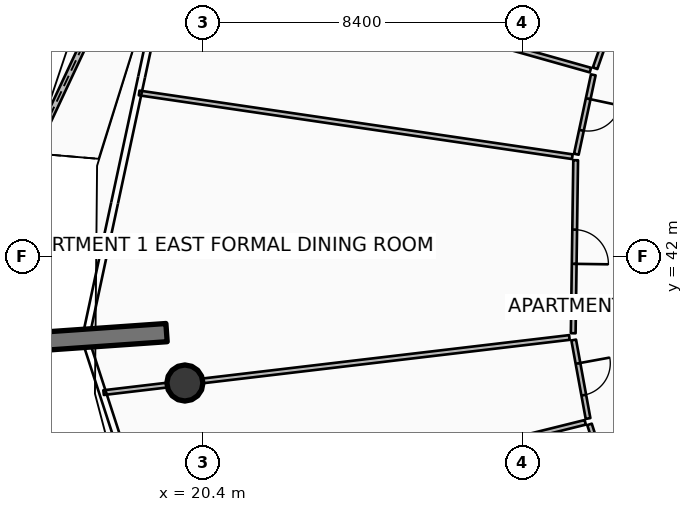
"""IFC4 building model, lengths in metres.
Left out: names, types, materials, properties, quantities, classifications, styles, units other than length and angle.
Written with IfcOpenShell. Run it as: python <this file> out.ifc"""

import sys

from ifc_helpers import new_model, si_unit, direction, frame, frame_2d, origin, origin_2d, place, context, subcontext, project, spatial, polyline, rectangle, circle, outline, extrude, element, fill, save


model = new_model("IFC4")
c1 = context("Model", 3, precision=1e-05, world=origin(), true_north=direction((0.0, 1.0)))
c2 = subcontext(c1, "Body", "Model", "MODEL_VIEW")
j1 = project(units=[si_unit("LENGTHUNIT", "METRE"), si_unit("PLANEANGLEUNIT", "RADIAN")], contexts=[c1])
p1 = place(None, origin())
s1 = spatial("IfcSite", under=j1, at=p1, CompositionType="ELEMENT")
p2 = place(p1, origin())
s2 = spatial("IfcBuilding", under=s1, at=p2, CompositionType="ELEMENT")
p3 = place(p2, frame((0.0, 0.0, 248.25)))
s3 = spatial("IfcBuildingStorey", under=s2, at=p3, CompositionType="ELEMENT", Elevation=248.25)
p4 = place(p3, frame((19.438, 40.003, 0.0), z_axis=(0.0, 0.0, 1.0), x_axis=(-0.997563824095, -0.069759707979, 0.0)))
e1 = element("IfcWall", 1, at=p4, inside=s3, PredefinedType="SOLIDWALL", context=c2, shape_type="SweptSolid", body=[
    extrude(rectangle(XDim=3.5, YDim=0.48, at=frame_2d((1.75, 0.0))), origin(), (0.0, 0.0, 1.0), 3.85),
])
p5 = place(p3, frame((19.92, 38.677, 0.0), z_axis=(0.0, 0.0, 1.0), x_axis=(1.0, 0.0, 0.0)))
e2 = element("IfcColumn", 2, at=p5, inside=s3, PredefinedType="COLUMN", context=c2, shape_type="SweptSolid", body=[
    extrude(circle(Radius=0.475, at=origin_2d()), origin(), (0.0, 0.0, 1.0), 3.59),
])
p6 = place(p3, frame((21.012, 55.616, 0.0), z_axis=(0.0, 0.0, 1.0), x_axis=(-0.424181665689, -0.905577116812, 0.0)))
e3 = element("IfcWall", 3, at=p6, inside=s3, PredefinedType="PARAPET", context=c2, shape_type="SweptSolid", body=[
    extrude(outline(polyline([(0.0, 0.0), (12.029, 0.0), (12.029, 1.224), (6.015, 1.127), (0.0, 1.148), (0.0, 0.0)])), frame((0.0, 0.09, 0.0), z_axis=(0.0, -1.0, 0.0), x_axis=(1.0, 0.0, 0.0)), (0.0, 0.0, 1.0), 0.18),
])
p7 = place(p3, frame((31.41, 48.938, 0.0), z_axis=(0.0, 0.0, 1.0), x_axis=(-0.331438416753, -0.943476854989, 0.0)))
e4 = element("IfcWall", 4, at=p7, inside=s3, PredefinedType="PARTITIONING", context=c2, shape_type="SweptSolid", body=[
    extrude(rectangle(XDim=2.099, YDim=0.125, at=frame_2d((1.049, 0.0))), origin(), (0.0, 0.0, 1.0), 2.957),
])
p8 = place(p7, frame((0.625, 0.0, 0.0)))
e5 = element("IfcOpeningElement", 5, at=p8, cuts=e4, PredefinedType="OPENING", context=c2, shape_type="SweptSolid", body=[
    extrude(rectangle(XDim=0.85, YDim=2.06, at=frame_2d((0.425, 1.03))), frame((0.0, 0.073, 0.0), z_axis=(0.0, -1.0, 0.0), x_axis=(1.0, 0.0, 0.0)), (0.0, 0.0, 1.0), 0.145),
])
p9 = place(p3, frame((30.592, 46.909, 0.0), z_axis=(0.0, 0.0, 1.0), x_axis=(-0.96245110957, 0.271455082266, 0.0)))
e6 = element("IfcWall", 6, at=p9, inside=s3, PredefinedType="PARTITIONING", context=c2, shape_type="SweptSolid", body=[
    extrude(rectangle(XDim=11.409, YDim=0.125, at=frame_2d((5.704, 0.0))), origin(), (0.0, 0.0, 1.0), 2.957),
])
p10 = place(p3, frame((30.115, 44.631, 0.0), z_axis=(0.0, 0.0, 1.0), x_axis=(-0.989347020715, 0.145576346298, 0.0)))
e7 = element("IfcWall", 7, at=p10, inside=s3, PredefinedType="PARTITIONING", context=c2, shape_type="SweptSolid", body=[
    extrude(rectangle(XDim=11.521, YDim=0.125, at=frame_2d((5.761, 0.0))), origin(), (0.0, 0.0, 1.0), 3.03),
])
p11 = place(p3, frame((30.667, 46.785, 0.0), z_axis=(0.0, 0.0, 1.0), x_axis=(-0.209005902588, -0.977914379014, 0.0)))
e8 = element("IfcWall", 8, at=p11, inside=s3, PredefinedType="PARTITIONING", context=c2, shape_type="SweptSolid", body=[
    extrude(rectangle(XDim=2.135, YDim=0.125, at=frame_2d((1.068, 0.0))), origin(), (0.0, 0.0, 1.0), 2.957),
])
p12 = place(p11, frame((0.643, 0.0, 0.0)))
e9 = element("IfcOpeningElement", 9, at=p12, cuts=e8, PredefinedType="OPENING", context=c2, shape_type="SweptSolid", body=[
    extrude(rectangle(XDim=0.85, YDim=2.06, at=frame_2d((0.425, 1.03))), frame((0.0, 0.073, 0.0), z_axis=(0.0, -1.0, 0.0), x_axis=(1.0, 0.0, 0.0)), (0.0, 0.0, 1.0), 0.145),
])
p13 = place(p3, frame((30.204, 44.538, 0.0), z_axis=(0.0, 0.0, 1.0), x_axis=(-0.014156354672, -0.999899793791, 0.0)))
e10 = element("IfcWall", 10, at=p13, inside=s3, PredefinedType="PARTITIONING", context=c2, shape_type="SweptSolid", body=[
    extrude(rectangle(XDim=4.553, YDim=0.125, at=frame_2d((2.276, 0.0))), origin(), (0.0, 0.0, 1.0), 2.957),
])
p14 = place(p13, frame((1.826, 0.0, 0.0)))
e11 = element("IfcOpeningElement", 11, at=p14, cuts=e10, PredefinedType="OPENING", context=c2, shape_type="SweptSolid", body=[
    extrude(rectangle(XDim=0.9, YDim=2.08, at=frame_2d((0.45, 1.04))), frame((0.0, 0.073, 0.0), z_axis=(0.0, -1.0, 0.0), x_axis=(1.0, 0.0, 0.0)), (0.0, 0.0, 1.0), 0.145),
])
p15 = place(p3, frame((30.038, 39.874, 0.0), z_axis=(0.0, 0.0, 1.0), x_axis=(-0.993068810962, -0.117534406428, 0.0)))
e12 = element("IfcWall", 12, at=p15, inside=s3, PredefinedType="PARTITIONING", context=c2, shape_type="SweptSolid", body=[
    extrude(rectangle(XDim=12.343, YDim=0.125, at=frame_2d((6.171, 0.0))), origin(), (0.0, 0.0, 1.0), 2.957),
])
p16 = place(p3, frame((30.456, 37.642, 0.0), z_axis=(0.0, 0.0, 1.0), x_axis=(-0.970505215381, -0.241080125513, 0.0)))
e13 = element("IfcWall", 13, at=p16, inside=s3, PredefinedType="PARTITIONING", context=c2, shape_type="SweptSolid", body=[
    extrude(rectangle(XDim=11.843, YDim=0.125, at=frame_2d((5.921, 0.0))), origin(), (0.0, 0.0, 1.0), 3.03),
])
p17 = place(p3, frame((30.152, 39.807, 0.0), z_axis=(0.0, 0.0, 1.0), x_axis=(0.179601937348, -0.983739367973, 0.0)))
e14 = element("IfcWall", 14, at=p17, inside=s3, PredefinedType="PARTITIONING", context=c2, shape_type="SweptSolid", body=[
    extrude(rectangle(XDim=2.099, YDim=0.125, at=frame_2d((1.049, 0.0))), origin(), (0.0, 0.0, 1.0), 2.957),
])
p18 = place(p17, frame((0.625, 0.0, 0.0)))
e15 = element("IfcOpeningElement", 15, at=p18, cuts=e14, PredefinedType="OPENING", context=c2, shape_type="SweptSolid", body=[
    extrude(rectangle(XDim=0.85, YDim=2.06, at=frame_2d((0.425, 1.03))), frame((0.0, 0.073, 0.0), z_axis=(0.0, -1.0, 0.0), x_axis=(1.0, 0.0, 0.0)), (0.0, 0.0, 1.0), 0.145),
])
p19 = place(p3, frame((30.568, 37.588, 0.0), z_axis=(0.0, 0.0, 1.0), x_axis=(0.305285840617, -0.952260760254, 0.0)))
e16 = element("IfcWall", 16, at=p19, inside=s3, PredefinedType="PARTITIONING", context=c2, shape_type="SweptSolid", body=[
    extrude(rectangle(XDim=2.24, YDim=0.125, at=frame_2d((1.12, 0.0))), origin(), (0.0, 0.0, 1.0), 3.03),
])
p20 = place(p19, frame((0.695, 0.0, 0.0)))
e17 = element("IfcOpeningElement", 17, at=p20, cuts=e16, PredefinedType="OPENING", context=c2, shape_type="SweptSolid", body=[
    extrude(rectangle(XDim=0.85, YDim=2.06, at=frame_2d((0.425, 1.03))), frame((0.0, 0.073, 0.0), z_axis=(0.0, -1.0, 0.0), x_axis=(1.0, 0.0, 0.0)), (0.0, 0.0, 1.0), 0.145),
])
p21 = place(p12, origin())
e18 = element("IfcDoor", 18, at=p21, inside=s3, OperationType="SINGLE_SWING_LEFT", PredefinedType="DOOR", context=c2, shape_type="SweptSolid", body=[
    extrude(rectangle(XDim=0.85, YDim=2.06, at=frame_2d((0.425, 1.03))), frame((0.0, 0.025, 0.0), z_axis=(0.0, -1.0, 0.0), x_axis=(1.0, 0.0, 0.0)), (0.0, 0.0, 1.0), 0.05),
])
fill(e9, e18)
p22 = place(p14, origin())
e19 = element("IfcDoor", 19, at=p22, inside=s3, OperationType="SINGLE_SWING_RIGHT", PredefinedType="DOOR", context=c2, shape_type="SweptSolid", body=[
    extrude(rectangle(XDim=0.9, YDim=2.08, at=frame_2d((0.45, 1.04))), frame((0.0, 0.025, 0.0), z_axis=(0.0, -1.0, 0.0), x_axis=(1.0, 0.0, 0.0)), (0.0, 0.0, 1.0), 0.05),
])
fill(e11, e19)
p23 = place(p18, origin())
e20 = element("IfcDoor", 20, at=p23, inside=s3, OperationType="SINGLE_SWING_LEFT", PredefinedType="DOOR", context=c2, shape_type="SweptSolid", body=[
    extrude(rectangle(XDim=0.85, YDim=2.06, at=frame_2d((0.425, 1.03))), frame((0.0, 0.025, 0.0), z_axis=(0.0, -1.0, 0.0), x_axis=(1.0, 0.0, 0.0)), (0.0, 0.0, 1.0), 0.05),
])
fill(e15, e20)
save(model, sys.argv[1])
